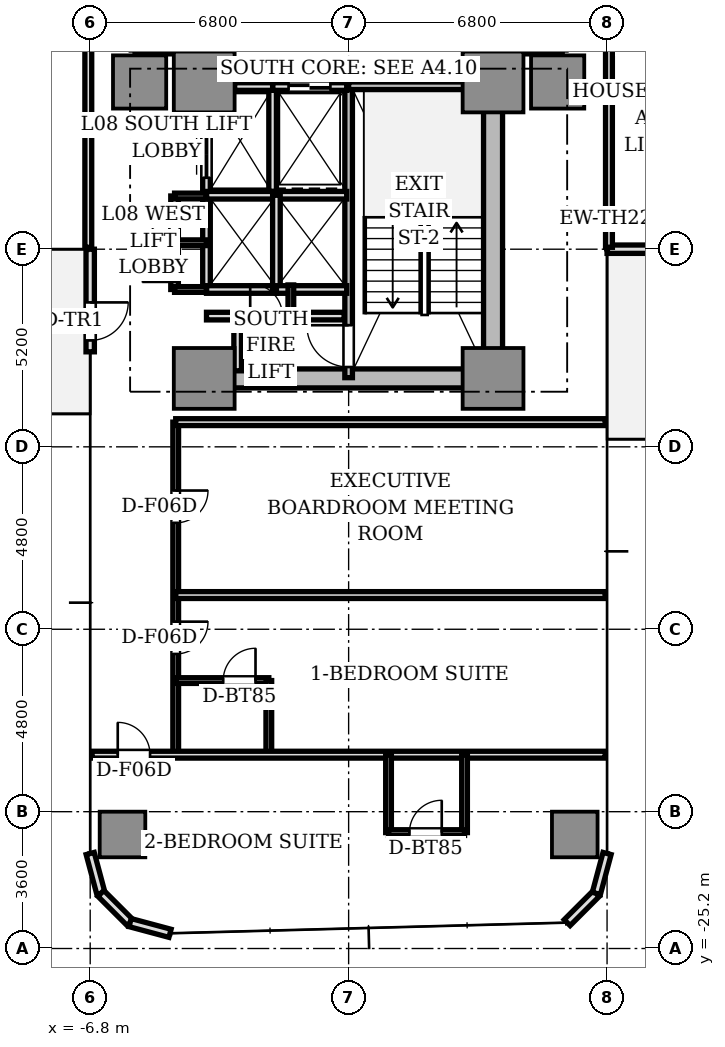
"""IFC4 building model, lengths in metres.
Left out: names, types, materials, properties, quantities, classifications, styles, units other than length and angle.
Written with IfcOpenShell. Run it as: python <this file> out.ifc"""

import sys

from ifc_helpers import new_model, si_unit, direction, frame, frame_2d, origin, origin_2d, place, context, subcontext, project, spatial, rectangle, extrude, source, transform, mapped, element, fill, save


model = new_model("IFC4")
c1 = context("Model", 3, precision=1e-05, world=origin(), true_north=direction((0.0, 1.0)))
c2 = subcontext(c1, "Body", "Model", "MODEL_VIEW")
j1 = project(units=[si_unit("LENGTHUNIT", "METRE"), si_unit("PLANEANGLEUNIT", "RADIAN")], contexts=[c1])
p1 = place(None, origin())
s1 = spatial("IfcSite", under=j1, at=p1, CompositionType="ELEMENT")
p2 = place(p1, origin())
s2 = spatial("IfcBuilding", under=s1, at=p2, CompositionType="ELEMENT")
p3 = place(p2, frame((0.0, 0.0, 33.15)))
s3 = spatial("IfcBuildingStorey", under=s2, at=p3, CompositionType="ELEMENT", Elevation=33.15)
p4 = place(p3, frame((-3.55, -10.2, 0.0), z_axis=(0.0, 0.0, 1.0), x_axis=(1.0, 0.0, 0.0)))
e1 = element("IfcWall", 1, at=p4, inside=s3, PredefinedType="SHEAR", context=c2, shape_type="SweptSolid", body=[
    extrude(rectangle(XDim=7.1, YDim=0.5, at=frame_2d((3.55, 0.0))), origin(), (0.0, 0.0, 1.0), 3.11),
])
p5 = place(p3, frame((3.8, -9.75, 0.0), z_axis=(0.0, 0.0, 1.0), x_axis=(0.0, 1.0, 0.0)))
e2 = element("IfcWall", 2, at=p5, inside=s3, PredefinedType="SHEAR", context=c2, shape_type="SweptSolid", body=[
    extrude(rectangle(XDim=6.9, YDim=0.5, at=frame_2d((3.45, 0.0))), origin(), (0.0, 0.0, 1.0), 3.11),
])
m1 = source(origin(), c2, "Body", "SweptSolid", [
    extrude(rectangle(XDim=1.6, YDim=1.6, at=origin_2d()), origin(), (0.0, 0.0, 1.0), 3.11),
])
for number, where, z_axis, x_axis in (
    (3, (-3.8, -2.4, 0.0), (0.0, 0.0, 1.0), (1.0, 0.0, 0.0)),
    (4, (3.8, -2.4, 0.0), (0.0, 0.0, 1.0), (1.0, 0.0, 0.0)),
    (5, (-3.8, -10.2, 0.0), (0.0, 0.0, 1.0), (1.0, 0.0, 0.0)),
    (6, (3.8, -10.2, 0.0), (0.0, 0.0, 1.0), (1.0, 0.0, 0.0)),
):
    element("IfcColumn", number, at=place(p3, frame(where, z_axis=z_axis, x_axis=x_axis)), inside=s3, PredefinedType="COLUMN", context=c2, shape_type="MappedRepresentation", body=[
        mapped(m1, transform((0.0, 0.0, 0.0), scale=1.0)),
    ])
m2 = source(origin(), c2, "Body", "SweptSolid", [
    extrude(rectangle(XDim=1.4, YDim=1.4, at=origin_2d()), origin(), (0.0, 0.0, 1.0), 3.11),
])
for number, where, z_axis, x_axis in (
    (7, (5.5, -2.4, 0.0), (0.0, 0.0, 1.0), (1.0, 0.0, 0.0)),
    (8, (-5.5, -2.4, 0.0), (0.0, 0.0, 1.0), (1.0, 0.0, 0.0)),
):
    element("IfcColumn", number, at=place(p3, frame(where, z_axis=z_axis, x_axis=x_axis)), inside=s3, PredefinedType="COLUMN", context=c2, shape_type="MappedRepresentation", body=[
        mapped(m2, transform((0.0, 0.0, 0.0), scale=1.0)),
    ])
m3 = source(origin(), c2, "Body", "SweptSolid", [
    extrude(rectangle(XDim=1.2, YDim=1.2, at=origin_2d()), origin(), (0.0, 0.0, 1.0), 3.11),
])
for number, where, z_axis, x_axis in (
    (9, (-5.95, -22.2, 0.0), (0.0, 0.0, 1.0), (1.0, 0.0, 0.0)),
    (10, (5.95, -22.2, 0.0), (0.0, 0.0, 1.0), (1.0, 0.0, 0.0)),
):
    element("IfcColumn", number, at=place(p3, frame(where, z_axis=z_axis, x_axis=x_axis)), inside=s3, PredefinedType="COLUMN", context=c2, shape_type="MappedRepresentation", body=[
        mapped(m3, transform((0.0, 0.0, 0.0), scale=1.0)),
    ])
p6 = place(p3, frame((6.8, -6.8, 0.0), z_axis=(0.0, 0.0, 1.0), x_axis=(1.0, 0.0, 0.0)))
e11 = element("IfcWall", 11, at=p6, inside=s3, PredefinedType="STANDARD", context=c2, shape_type="SweptSolid", body=[
    extrude(rectangle(XDim=2.7, YDim=0.22, at=frame_2d((1.35, 0.0))), origin(), (0.0, 0.0, 1.0), 3.11),
])
p7 = place(p6, frame((1.4, 0.0, 0.0)))
e12 = element("IfcOpeningElement", 12, at=p7, cuts=e11, PredefinedType="OPENING", context=c2, shape_type="SweptSolid", body=[
    extrude(rectangle(XDim=1.0, YDim=2.2, at=frame_2d((0.5, 1.1))), frame((0.0, 0.12, 0.0), z_axis=(0.0, -1.0, 0.0), x_axis=(1.0, 0.0, 0.0)), (0.0, 0.0, 1.0), 0.24),
])
p8 = place(p3, frame((-6.8, -6.8, 0.0), z_axis=(0.0, 0.0, 1.0), x_axis=(0.0, -1.0, 0.0)))
e13 = element("IfcWall", 13, at=p8, inside=s3, PredefinedType="STANDARD", context=c2, shape_type="SweptSolid", body=[
    extrude(rectangle(XDim=2.7, YDim=0.22, at=frame_2d((1.35, 0.0))), origin(), (0.0, 0.0, 1.0), 3.11),
])
p9 = place(p8, frame((1.4, 0.0, 0.0)))
e14 = element("IfcOpeningElement", 14, at=p9, cuts=e13, PredefinedType="OPENING", context=c2, shape_type="SweptSolid", body=[
    extrude(rectangle(XDim=1.0, YDim=2.2, at=frame_2d((0.5, 1.1))), frame((0.0, 0.12, 0.0), z_axis=(0.0, -1.0, 0.0), x_axis=(1.0, 0.0, 0.0)), (0.0, 0.0, 1.0), 0.24),
])
for number, where, z_axis, x_axis in (
    (15, (-6.8, -22.7, 0.0), (0.0, 0.0, 1.0), (0.259, -0.966, 0.0)),
    (16, (-6.519, -23.75, 0.0), (0.0, 0.0, 1.0), (0.707, -0.707, 0.0)),
    (17, (-5.75, -24.519, 0.0), (0.0, 0.0, 1.0), (0.966, -0.259, 0.0)),
    (18, (5.75, -24.519, 0.0), (0.0, 0.0, 1.0), (0.707, 0.707, 0.0)),
    (19, (6.519, -23.75, 0.0), (0.0, 0.0, 1.0), (0.259, 0.966, 0.0)),
):
    element("IfcWall", number, at=place(p3, frame(where, z_axis=z_axis, x_axis=x_axis)), inside=s3, PredefinedType="STANDARD", context=c2, shape_type="SweptSolid", body=[
        extrude(rectangle(XDim=1.087, YDim=0.22, at=frame_2d((0.543, 0.0))), origin(), (0.0, 0.0, 1.0), 3.11),
    ])
p10 = place(p3, frame((0.0, -10.18, 0.0), z_axis=(0.0, 0.0, 1.0), x_axis=(0.0, 1.0, 0.0)))
e20 = element("IfcWall", 20, at=p10, inside=s3, PredefinedType="SOLIDWALL", context=c2, shape_type="SweptSolid", body=[
    extrude(rectangle(XDim=7.68, YDim=0.2, at=frame_2d((3.84, 0.0))), origin(), (0.0, 0.0, 1.0), 3.11),
])
p11 = place(p10, frame((0.28, 0.0, 0.0)))
e21 = element("IfcOpeningElement", 21, at=p11, cuts=e20, PredefinedType="OPENING", context=c2, shape_type="SweptSolid", body=[
    extrude(rectangle(XDim=1.1, YDim=2.15, at=frame_2d((0.55, 1.075))), frame((0.0, 0.11, 0.0), z_axis=(0.0, -1.0, 0.0), x_axis=(1.0, 0.0, 0.0)), (0.0, 0.0, 1.0), 0.22),
])
p12 = place(p3, frame((0.0, -2.5, 0.0), z_axis=(0.0, 0.0, 1.0), x_axis=(1.0, 0.0, 0.0)))
e22 = element("IfcWall", 22, at=p12, inside=s3, PredefinedType="SOLIDWALL", context=c2, shape_type="SweptSolid", body=[
    extrude(rectangle(XDim=3.72, YDim=0.2, at=frame_2d((1.86, 0.0))), origin(), (0.0, 0.0, 1.0), 3.11),
])
p13 = place(p3, frame((-2.0, -5.28, 0.0), z_axis=(0.0, 0.0, 1.0), x_axis=(0.0, 1.0, 0.0)))
e23 = element("IfcWall", 23, at=p13, inside=s3, PredefinedType="SOLIDWALL", context=c2, shape_type="SweptSolid", body=[
    extrude(rectangle(XDim=2.78, YDim=0.2, at=frame_2d((1.39, 0.0))), origin(), (0.0, 0.0, 1.0), 2.66),
])
p14 = place(p3, frame((-2.0, -2.52, 0.0), z_axis=(0.0, 0.0, 1.0), x_axis=(1.0, 0.0, 0.0)))
e24 = element("IfcWall", 24, at=p14, inside=s3, PredefinedType="SOLIDWALL", context=c2, shape_type="SweptSolid", body=[
    extrude(rectangle(XDim=1.95, YDim=0.2, at=frame_2d((0.975, 0.0))), origin(), (0.0, 0.0, 1.0), 2.66),
])
p15 = place(p14, frame((0.42, 0.0, 0.0)))
e25 = element("IfcOpeningElement", 25, at=p15, cuts=e24, PredefinedType="OPENING", context=c2, shape_type="SweptSolid", body=[
    extrude(rectangle(XDim=1.1, YDim=2.2, at=frame_2d((0.55, 1.1))), frame((0.0, 0.11, 0.0), z_axis=(0.0, -1.0, 0.0), x_axis=(1.0, 0.0, 0.0)), (0.0, 0.0, 1.0), 0.22),
])
p16 = place(p3, frame((-3.0, -2.52, 0.0), z_axis=(0.0, 0.0, 1.0), x_axis=(1.0, 0.0, 0.0)))
e26 = element("IfcWall", 26, at=p16, inside=s3, PredefinedType="SOLIDWALL", context=c2, shape_type="SweptSolid", body=[
    extrude(rectangle(XDim=1.0, YDim=0.2, at=frame_2d((0.5, 0.0))), origin(), (0.0, 0.0, 1.0), 2.66),
])
p17 = place(p3, frame((-3.74, -5.36, 0.0), z_axis=(0.0, 0.0, 1.0), x_axis=(0.0, 1.0, 0.0)))
e27 = element("IfcWall", 27, at=p17, inside=s3, PredefinedType="SOLIDWALL", context=c2, shape_type="SweptSolid", body=[
    extrude(rectangle(XDim=2.08, YDim=0.2, at=frame_2d((1.04, 0.0))), origin(), (0.0, 0.0, 1.0), 2.66),
])
p18 = place(p17, frame((0.44, 0.0, 0.0)))
e28 = element("IfcOpeningElement", 28, at=p18, cuts=e27, PredefinedType="OPENING", context=c2, shape_type="SweptSolid", body=[
    extrude(rectangle(XDim=1.2, YDim=2.2, at=frame_2d((0.6, 1.1))), frame((0.0, 0.11, 0.0), z_axis=(0.0, -1.0, 0.0), x_axis=(1.0, 0.0, 0.0)), (0.0, 0.0, 1.0), 0.22),
])
p19 = place(p3, frame((-3.74, -7.86, 0.0), z_axis=(0.0, 0.0, 1.0), x_axis=(0.0, 1.0, 0.0)))
e29 = element("IfcWall", 29, at=p19, inside=s3, PredefinedType="SOLIDWALL", context=c2, shape_type="SweptSolid", body=[
    extrude(rectangle(XDim=2.48, YDim=0.2, at=frame_2d((1.24, 0.0))), origin(), (0.0, 0.0, 1.0), 2.66),
])
p20 = place(p3, frame((-3.74, -7.86, 0.0), z_axis=(0.0, 0.0, 1.0), x_axis=(1.0, 0.0, 0.0)))
e30 = element("IfcWall", 30, at=p20, inside=s3, PredefinedType="SOLIDWALL", context=c2, shape_type="SweptSolid", body=[
    extrude(rectangle(XDim=1.84, YDim=0.2, at=frame_2d((0.92, 0.0))), origin(), (0.0, 0.0, 1.0), 2.66),
])
p21 = place(p3, frame((-3.74, -5.38, 0.0), z_axis=(0.0, 0.0, 1.0), x_axis=(1.0, 0.0, 0.0)))
e31 = element("IfcWall", 31, at=p21, inside=s3, PredefinedType="SOLIDWALL", context=c2, shape_type="SweptSolid", body=[
    extrude(rectangle(XDim=3.69, YDim=0.2, at=frame_2d((1.845, 0.0))), origin(), (0.0, 0.0, 1.0), 2.66),
])
p22 = place(p3, frame((-1.9, -7.86, 0.0), z_axis=(0.0, 0.0, 1.0), x_axis=(0.0, 1.0, 0.0)))
e32 = element("IfcWall", 32, at=p22, inside=s3, PredefinedType="SOLIDWALL", context=c2, shape_type="SweptSolid", body=[
    extrude(rectangle(XDim=2.48, YDim=0.2, at=frame_2d((1.24, 0.0))), origin(), (0.0, 0.0, 1.0), 2.66),
])
p23 = place(p3, frame((-1.9, -7.86, 0.0), z_axis=(0.0, 0.0, 1.0), x_axis=(1.0, 0.0, 0.0)))
e33 = element("IfcWall", 33, at=p23, inside=s3, PredefinedType="SOLIDWALL", context=c2, shape_type="SweptSolid", body=[
    extrude(rectangle(XDim=1.85, YDim=0.2, at=frame_2d((0.925, 0.0))), origin(), (0.0, 0.0, 1.0), 2.66),
])
for number, where, z_axis, x_axis in (
    (34, (3.98, -1.56, 0.0), (0.0, 0.0, 1.0), (1.0, 0.0, 0.0)),
    (35, (-5.62, -1.56, 0.0), (0.0, 0.0, 1.0), (1.0, 0.0, 0.0)),
):
    element("IfcWall", number, at=place(p3, frame(where, z_axis=z_axis, x_axis=x_axis)), inside=s3, PredefinedType="SOLIDWALL", context=c2, shape_type="SweptSolid", body=[
        extrude(rectangle(XDim=1.64, YDim=0.2, at=frame_2d((0.82, 0.0))), origin(), (0.0, 0.0, 1.0), 2.66),
    ])
p24 = place(p3, frame((-3.74, -8.56, 0.0), z_axis=(0.0, 0.0, 1.0), x_axis=(1.0, 0.0, 0.0)))
e36 = element("IfcWall", 36, at=p24, inside=s3, PredefinedType="SOLIDWALL", context=c2, shape_type="SweptSolid", body=[
    extrude(rectangle(XDim=3.62, YDim=0.2, at=frame_2d((1.81, 0.0))), origin(), (0.0, 0.0, 1.0), 2.66),
])
p25 = place(p24, frame((1.15, 0.0, 0.0)))
e37 = element("IfcOpeningElement", 37, at=p25, cuts=e36, PredefinedType="OPENING", context=c2, shape_type="SweptSolid", body=[
    extrude(rectangle(XDim=0.85, YDim=2.1, at=frame_2d((0.425, 1.05))), frame((0.0, 0.11, 0.0), z_axis=(0.0, -1.0, 0.0), x_axis=(1.0, 0.0, 0.0)), (0.0, 0.0, 1.0), 0.22),
])
p26 = place(p3, frame((-2.92, -10.0, 0.0), z_axis=(0.0, 0.0, 1.0), x_axis=(0.0, 1.0, 0.0)))
e38 = element("IfcWall", 38, at=p26, inside=s3, PredefinedType="SOLIDWALL", context=c2, shape_type="SweptSolid", body=[
    extrude(rectangle(XDim=1.44, YDim=0.2, at=frame_2d((0.72, 0.0))), origin(), (0.0, 0.0, 1.0), 2.66),
])
p27 = place(p3, frame((-1.52, -8.56, 0.0), z_axis=(0.0, 0.0, 1.0), x_axis=(0.0, 1.0, 0.0)))
e39 = element("IfcWall", 39, at=p27, inside=s3, PredefinedType="PARTITIONING", context=c2, shape_type="SweptSolid", body=[
    extrude(rectangle(XDim=0.82, YDim=0.15, at=frame_2d((0.41, 0.0))), origin(), (0.0, 0.0, 1.0), 2.66),
])
p28 = place(p3, frame((-4.58, -7.86, 0.0), z_axis=(0.0, 0.0, 1.0), x_axis=(0.0, 1.0, 0.0)))
e40 = element("IfcWall", 40, at=p28, inside=s3, PredefinedType="SOLIDWALL", context=c2, shape_type="SweptSolid", body=[
    extrude(rectangle(XDim=2.46, YDim=0.2, at=frame_2d((1.23, 0.0))), origin(), (0.0, 0.0, 1.0), 2.66),
])
p29 = place(p28, frame((0.2, 0.0, 0.0)))
e41 = element("IfcOpeningElement", 41, at=p29, cuts=e40, PredefinedType="OPENING", context=c2, shape_type="SweptSolid", body=[
    extrude(rectangle(XDim=0.85, YDim=2.1, at=frame_2d((0.425, 1.05))), frame((0.0, 0.11, 0.0), z_axis=(0.0, -1.0, 0.0), x_axis=(1.0, 0.0, 0.0)), (0.0, 0.0, 1.0), 0.22),
])
p30 = place(p28, frame((1.38, 0.0, 0.0)))
e42 = element("IfcOpeningElement", 42, at=p30, cuts=e40, PredefinedType="OPENING", context=c2, shape_type="SweptSolid", body=[
    extrude(rectangle(XDim=0.85, YDim=2.1, at=frame_2d((0.425, 1.05))), frame((0.0, 0.11, 0.0), z_axis=(0.0, -1.0, 0.0), x_axis=(1.0, 0.0, 0.0)), (0.0, 0.0, 1.0), 0.22),
])
for number, where, z_axis, x_axis in (
    (43, (-4.58, -5.4, 0.0), (0.0, 0.0, 1.0), (1.0, 0.0, 0.0)),
    (44, (-4.58, -7.86, 0.0), (0.0, 0.0, 1.0), (1.0, 0.0, 0.0)),
    (45, (-4.58, -6.63, 0.0), (0.0, 0.0, 1.0), (1.0, 0.0, 0.0)),
):
    element("IfcWall", number, at=place(p3, frame(where, z_axis=z_axis, x_axis=x_axis)), inside=s3, PredefinedType="PARTITIONING", context=c2, shape_type="SweptSolid", body=[
        extrude(rectangle(XDim=0.84, YDim=0.15, at=frame_2d((0.42, 0.0))), origin(), (0.0, 0.0, 1.0), 2.66),
    ])
for number, where, z_axis, x_axis in (
    (46, (6.85, -6.75, 0.0), (0.0, 0.0, 1.0), (0.0, 1.0, 0.0)),
    (47, (-6.85, -0.95, 0.0), (0.0, 0.0, 1.0), (0.0, -1.0, 0.0)),
):
    element("IfcWall", number, at=place(p3, frame(where, z_axis=z_axis, x_axis=x_axis)), inside=s3, PredefinedType="PARTITIONING", context=c2, shape_type="SweptSolid", body=[
        extrude(rectangle(XDim=5.8, YDim=0.18, at=frame_2d((2.9, 0.0))), origin(), (0.0, 0.0, 1.0), 2.66),
    ])
p31 = place(p3, frame((-4.55, -11.35, 0.0), z_axis=(0.0, 0.0, 1.0), x_axis=(0.0, -1.0, 0.0)))
e48 = element("IfcWall", 48, at=p31, inside=s3, PredefinedType="PARTITIONING", context=c2, shape_type="SweptSolid", body=[
    extrude(rectangle(XDim=8.75, YDim=0.15, at=frame_2d((4.375, 0.0))), origin(), (0.0, 0.0, 1.0), 2.63),
])
p32 = place(p31, frame((1.8, 0.0, 0.0)))
e49 = element("IfcOpeningElement", 49, at=p32, cuts=e48, PredefinedType="OPENING", context=c2, shape_type="SweptSolid", body=[
    extrude(rectangle(XDim=0.85, YDim=2.1, at=frame_2d((0.425, 1.05))), frame((0.0, 0.085, 0.0), z_axis=(0.0, -1.0, 0.0), x_axis=(1.0, 0.0, 0.0)), (0.0, 0.0, 1.0), 0.17),
])
p33 = place(p31, frame((5.25, 0.0, 0.0)))
e50 = element("IfcOpeningElement", 50, at=p33, cuts=e48, PredefinedType="OPENING", context=c2, shape_type="SweptSolid", body=[
    extrude(rectangle(XDim=0.85, YDim=2.1, at=frame_2d((0.425, 1.05))), frame((0.0, 0.085, 0.0), z_axis=(0.0, -1.0, 0.0), x_axis=(1.0, 0.0, 0.0)), (0.0, 0.0, 1.0), 0.17),
])
for number, where, z_axis, x_axis in (
    (51, (-4.55, -11.35, 0.0), (0.0, 0.0, 1.0), (1.0, 0.0, 0.0)),
    (52, (-4.55, -15.9, 0.0), (0.0, 0.0, 1.0), (1.0, 0.0, 0.0)),
):
    element("IfcWall", number, at=place(p3, frame(where, z_axis=z_axis, x_axis=x_axis)), inside=s3, PredefinedType="PARTITIONING", context=c2, shape_type="SweptSolid", body=[
        extrude(rectangle(XDim=11.3, YDim=0.18, at=frame_2d((5.65, 0.0))), origin(), (0.0, 0.0, 1.0), 2.66),
    ])
p34 = place(p3, frame((-4.55, -18.15, 0.0), z_axis=(0.0, 0.0, 1.0), x_axis=(1.0, 0.0, 0.0)))
e53 = element("IfcWall", 53, at=p34, inside=s3, PredefinedType="PARTITIONING", context=c2, shape_type="SweptSolid", body=[
    extrude(rectangle(XDim=2.45, YDim=0.15, at=frame_2d((1.225, 0.0))), origin(), (0.0, 0.0, 1.0), 2.66),
])
p35 = place(p34, frame((1.25, 0.0, 0.0)))
e54 = element("IfcOpeningElement", 54, at=p35, cuts=e53, PredefinedType="OPENING", context=c2, shape_type="SweptSolid", body=[
    extrude(rectangle(XDim=0.85, YDim=2.1, at=frame_2d((0.425, 1.05))), frame((0.0, 0.085, 0.0), z_axis=(0.0, -1.0, 0.0), x_axis=(1.0, 0.0, 0.0)), (0.0, 0.0, 1.0), 0.17),
])
p36 = place(p3, frame((-2.1, -18.15, 0.0), z_axis=(0.0, 0.0, 1.0), x_axis=(0.0, -1.0, 0.0)))
e55 = element("IfcWall", 55, at=p36, inside=s3, PredefinedType="PARTITIONING", context=c2, shape_type="SweptSolid", body=[
    extrude(rectangle(XDim=1.95, YDim=0.15, at=frame_2d((0.975, 0.0))), origin(), (0.0, 0.0, 1.0), 2.66),
])
p37 = place(p3, frame((-6.75, -20.1, 0.0), z_axis=(0.0, 0.0, 1.0), x_axis=(1.0, 0.0, 0.0)))
e56 = element("IfcWall", 56, at=p37, inside=s3, PredefinedType="PARTITIONING", context=c2, shape_type="SweptSolid", body=[
    extrude(rectangle(XDim=13.5, YDim=0.18, at=frame_2d((6.75, 0.0))), origin(), (0.0, 0.0, 1.0), 2.66),
])
p38 = place(p37, frame((0.675, 0.0, 0.0)))
e57 = element("IfcOpeningElement", 57, at=p38, cuts=e56, PredefinedType="OPENING", context=c2, shape_type="SweptSolid", body=[
    extrude(rectangle(XDim=0.85, YDim=2.1, at=frame_2d((0.425, 1.05))), frame((0.0, 0.1, 0.0), z_axis=(0.0, -1.0, 0.0), x_axis=(1.0, 0.0, 0.0)), (0.0, 0.0, 1.0), 0.2),
])
for number, where, z_axis, x_axis in (
    (58, (3.05, -20.1, 0.0), (0.0, 0.0, 1.0), (0.0, -1.0, 0.0)),
    (59, (1.05, -20.1, 0.0), (0.0, 0.0, 1.0), (0.0, -1.0, 0.0)),
):
    element("IfcWall", number, at=place(p3, frame(where, z_axis=z_axis, x_axis=x_axis)), inside=s3, PredefinedType="PARTITIONING", context=c2, shape_type="SweptSolid", body=[
        extrude(rectangle(XDim=2.05, YDim=0.15, at=frame_2d((1.025, 0.0))), origin(), (0.0, 0.0, 1.0), 2.66),
    ])
p39 = place(p3, frame((1.05, -22.15, 0.0), z_axis=(0.0, 0.0, 1.0), x_axis=(1.0, 0.0, 0.0)))
e60 = element("IfcWall", 60, at=p39, inside=s3, PredefinedType="PARTITIONING", context=c2, shape_type="SweptSolid", body=[
    extrude(rectangle(XDim=2.0, YDim=0.15, at=frame_2d((1.0, 0.0))), origin(), (0.0, 0.0, 1.0), 2.58),
])
p40 = place(p39, frame((0.55, 0.0, 0.0)))
e61 = element("IfcOpeningElement", 61, at=p40, cuts=e60, PredefinedType="OPENING", context=c2, shape_type="SweptSolid", body=[
    extrude(rectangle(XDim=0.85, YDim=2.1, at=frame_2d((0.425, 1.05))), frame((0.0, 0.085, 0.0), z_axis=(0.0, -1.0, 0.0), x_axis=(1.0, 0.0, 0.0)), (0.0, 0.0, 1.0), 0.17),
])
m4 = source(origin(), c2, "Body", "SweptSolid", [
    extrude(rectangle(XDim=1.0, YDim=0.05, at=origin_2d()), origin(), (0.0, 0.0, 1.0), 2.2),
])
p41 = place(p9, frame((0.5, 0.0, 0.0)))
e62 = element("IfcDoor", 62, at=p41, inside=s3, OperationType="SINGLE_SWING_LEFT", PredefinedType="DOOR", context=c2, shape_type="MappedRepresentation", body=[
    mapped(m4, transform((0.0, 0.0, 0.0), scale=1.0)),
])
fill(e14, e62)
m5 = source(origin(), c2, "Body", "SweptSolid", [
    extrude(rectangle(XDim=1.1, YDim=0.05, at=origin_2d()), origin(), (0.0, 0.0, 1.0), 2.2),
])
p42 = place(p15, frame((0.55, 0.0, 0.0)))
e63 = element("IfcDoor", 63, at=p42, inside=s3, OperationType="DOUBLE_DOOR_SLIDING", PredefinedType="DOOR", context=c2, shape_type="MappedRepresentation", body=[
    mapped(m5, transform((0.0, 0.0, 0.0), scale=1.0)),
])
fill(e25, e63)
m6 = source(origin(), c2, "Body", "SweptSolid", [
    extrude(rectangle(XDim=1.2, YDim=0.05, at=origin_2d()), origin(), (0.0, 0.0, 1.0), 2.2),
])
p43 = place(p18, frame((0.6, 0.0, 0.0)))
e64 = element("IfcDoor", 64, at=p43, inside=s3, OperationType="DOUBLE_DOOR_SLIDING", PredefinedType="DOOR", context=c2, shape_type="MappedRepresentation", body=[
    mapped(m6, transform((0.0, 0.0, 0.0), scale=1.0)),
])
fill(e28, e64)
m7 = source(origin(), c2, "Body", "SweptSolid", [
    extrude(rectangle(XDim=1.1, YDim=0.05, at=origin_2d()), origin(), (0.0, 0.0, 1.0), 2.15),
])
p44 = place(p11, frame((0.55, 0.0, 0.0)))
e65 = element("IfcDoor", 65, at=p44, inside=s3, OperationType="SINGLE_SWING_RIGHT", PredefinedType="DOOR", context=c2, shape_type="MappedRepresentation", body=[
    mapped(m7, transform((0.0, 0.0, 0.0), scale=1.0)),
])
fill(e21, e65)
m8 = source(origin(), c2, "Body", "SweptSolid", [
    extrude(rectangle(XDim=0.85, YDim=0.05, at=origin_2d()), origin(), (0.0, 0.0, 1.0), 2.1),
])
p45 = place(p25, frame((0.425, 0.0, 0.0)))
e66 = element("IfcDoor", 66, at=p45, inside=s3, OperationType="SINGLE_SWING_LEFT", PredefinedType="DOOR", context=c2, shape_type="MappedRepresentation", body=[
    mapped(m8, transform((0.0, 0.0, 0.0), scale=1.0)),
])
fill(e37, e66)
p46 = place(p29, frame((0.425, 0.0, 0.0)))
e67 = element("IfcDoor", 67, at=p46, inside=s3, OperationType="SINGLE_SWING_LEFT", PredefinedType="DOOR", context=c2, shape_type="MappedRepresentation", body=[
    mapped(m8, transform((0.0, 0.0, 0.0), scale=1.0)),
])
fill(e41, e67)
p47 = place(p30, frame((0.425, 0.0, 0.0)))
e68 = element("IfcDoor", 68, at=p47, inside=s3, OperationType="SINGLE_SWING_RIGHT", PredefinedType="DOOR", context=c2, shape_type="MappedRepresentation", body=[
    mapped(m8, transform((0.0, 0.0, 0.0), scale=1.0)),
])
fill(e42, e68)
p48 = place(p32, frame((0.425, 0.0, 0.0)))
e69 = element("IfcDoor", 69, at=p48, inside=s3, OperationType="SINGLE_SWING_LEFT", PredefinedType="DOOR", context=c2, shape_type="MappedRepresentation", body=[
    mapped(m8, transform((0.0, 0.0, 0.0), scale=1.0)),
])
fill(e49, e69)
p49 = place(p35, frame((0.425, 0.0, 0.0)))
e70 = element("IfcDoor", 70, at=p49, inside=s3, OperationType="SINGLE_SWING_RIGHT", PredefinedType="DOOR", context=c2, shape_type="MappedRepresentation", body=[
    mapped(m8, transform((0.0, 0.0, 0.0), scale=1.0)),
])
fill(e54, e70)
p50 = place(p33, frame((0.425, 0.0, 0.0)))
e71 = element("IfcDoor", 71, at=p50, inside=s3, OperationType="SINGLE_SWING_LEFT", PredefinedType="DOOR", context=c2, shape_type="MappedRepresentation", body=[
    mapped(m8, transform((0.0, 0.0, 0.0), scale=1.0)),
])
fill(e50, e71)
p51 = place(p40, frame((0.425, 0.0, 0.0)))
e72 = element("IfcDoor", 72, at=p51, inside=s3, OperationType="SINGLE_SWING_RIGHT", PredefinedType="DOOR", context=c2, shape_type="MappedRepresentation", body=[
    mapped(m8, transform((0.0, 0.0, 0.0), scale=1.0)),
])
fill(e61, e72)
p52 = place(p38, frame((0.425, 0.0, 0.0)))
e73 = element("IfcDoor", 73, at=p52, inside=s3, OperationType="SINGLE_SWING_LEFT", PredefinedType="DOOR", context=c2, shape_type="MappedRepresentation", body=[
    mapped(m8, transform((0.0, 0.0, 0.0), scale=1.0)),
])
fill(e57, e73)
save(model, sys.argv[1])
